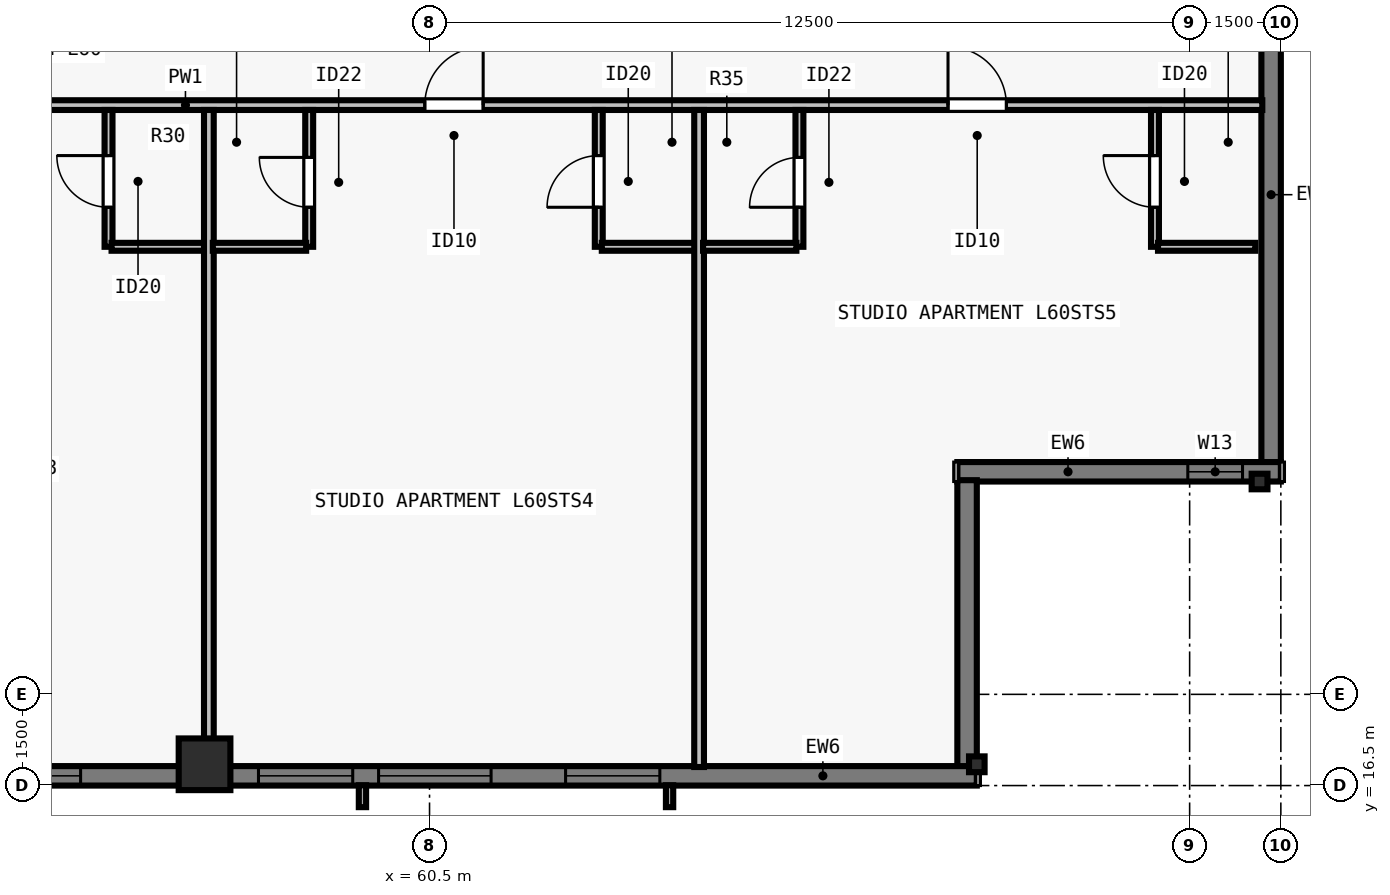
"""IFC4 building model, lengths in metres.
Left out: names, types, materials, properties, quantities, classifications, styles, units other than length and angle.
Written with IfcOpenShell. Run it as: python <this file> out.ifc"""

import sys

from ifc_helpers import new_model, si_unit, direction, frame, frame_2d, origin, origin_2d, place, context, subcontext, project, spatial, rectangle, i_section, extrude, element, fill, save


model = new_model("IFC4")
c1 = context("Model", 3, precision=1e-05, world=origin(), true_north=direction((0.0, 1.0)))
c2 = subcontext(c1, "Body", "Model", "MODEL_VIEW")
j1 = project(units=[si_unit("LENGTHUNIT", "METRE"), si_unit("PLANEANGLEUNIT", "RADIAN")], contexts=[c1])
p1 = place(None, origin())
s1 = spatial("IfcSite", under=j1, at=p1, CompositionType="ELEMENT")
p2 = place(p1, origin())
s2 = spatial("IfcBuilding", under=s1, at=p2, CompositionType="ELEMENT")
p3 = place(p2, frame((0.0, 0.0, 220.0)))
s3 = spatial("IfcBuildingStorey", under=s2, at=p3, CompositionType="ELEMENT", Elevation=220.0)
p4 = place(p3, frame((56.8, 16.85, 0.0), z_axis=(0.0, 0.0, 1.0), x_axis=(1.0, 0.0, 0.0)))
e1 = element("IfcColumn", 1, at=p4, inside=s3, PredefinedType="COLUMN", context=c2, shape_type="SweptSolid", body=[
    extrude(rectangle(XDim=0.85, YDim=0.85, at=origin_2d()), origin(), (0.0, 0.0, 1.0), 3.5),
])
for number, where, z_axis, x_axis in (
    (2, (69.5, 16.85, 0.0), (0.0, 0.0, 1.0), (1.0, 0.0, 0.0)),
    (3, (74.15, 21.5, 0.0), (0.0, 0.0, 1.0), (0.0, 1.0, 0.0)),
):
    element("IfcColumn", number, at=place(p3, frame(where, z_axis=z_axis, x_axis=x_axis)), inside=s3, PredefinedType="COLUMN", context=c2, shape_type="SweptSolid", body=[
        extrude(i_section(OverallWidth=0.256, OverallDepth=0.26, WebThickness=0.01, FlangeThickness=0.017, FilletRadius=0.013, at=origin_2d()), origin(), (0.0, 0.0, 1.0), 3.5),
    ])
p5 = place(p3, frame((74.34, 56.5, 0.0), z_axis=(0.0, 0.0, 1.0), x_axis=(0.0, -1.0, 0.0)))
e4 = element("IfcWall", 4, at=p5, inside=s3, PredefinedType="SOLIDWALL", context=c2, shape_type="SweptSolid", body=[
    extrude(rectangle(XDim=34.702, YDim=0.32, at=frame_2d((17.351, 0.0))), origin(), (0.0, 0.0, 1.0), 3.29),
])
p6 = place(p5, frame((4.312, 0.0, 0.8)))
e5 = element("IfcOpeningElement", 5, at=p6, cuts=e4, PredefinedType="OPENING", context=c2, shape_type="SweptSolid", body=[
    extrude(rectangle(XDim=1.55, YDim=1.678, at=frame_2d((0.775, 0.839))), frame((0.0, 0.17, 0.0), z_axis=(0.0, -1.0, 0.0), x_axis=(1.0, 0.0, 0.0)), (0.0, 0.0, 1.0), 0.34),
])
p7 = place(p5, frame((6.738, 0.0, 0.8)))
e6 = element("IfcOpeningElement", 6, at=p7, cuts=e4, PredefinedType="OPENING", context=c2, shape_type="SweptSolid", body=[
    extrude(rectangle(XDim=1.85, YDim=1.678, at=frame_2d((0.925, 0.839))), frame((0.0, 0.17, 0.0), z_axis=(0.0, -1.0, 0.0), x_axis=(1.0, 0.0, 0.0)), (0.0, 0.0, 1.0), 0.34),
])
p8 = place(p5, frame((10.263, 0.0, 0.8)))
e7 = element("IfcOpeningElement", 7, at=p8, cuts=e4, PredefinedType="OPENING", context=c2, shape_type="SweptSolid", body=[
    extrude(rectangle(XDim=1.55, YDim=1.678, at=frame_2d((0.775, 0.839))), frame((0.0, 0.17, 0.0), z_axis=(0.0, -1.0, 0.0), x_axis=(1.0, 0.0, 0.0)), (0.0, 0.0, 1.0), 0.34),
])
p9 = place(p5, frame((13.488, 0.0, 0.8)))
e8 = element("IfcOpeningElement", 8, at=p9, cuts=e4, PredefinedType="OPENING", context=c2, shape_type="SweptSolid", body=[
    extrude(rectangle(XDim=1.85, YDim=1.678, at=frame_2d((0.925, 0.839))), frame((0.0, 0.17, 0.0), z_axis=(0.0, -1.0, 0.0), x_axis=(1.0, 0.0, 0.0)), (0.0, 0.0, 1.0), 0.34),
])
p10 = place(p5, frame((18.264, 0.0, 0.8)))
e9 = element("IfcOpeningElement", 9, at=p10, cuts=e4, PredefinedType="OPENING", context=c2, shape_type="SweptSolid", body=[
    extrude(rectangle(XDim=1.55, YDim=1.678, at=frame_2d((0.775, 0.839))), frame((0.0, 0.17, 0.0), z_axis=(0.0, -1.0, 0.0), x_axis=(1.0, 0.0, 0.0)), (0.0, 0.0, 1.0), 0.34),
])
p11 = place(p5, frame((24.164, 0.0, 0.8)))
e10 = element("IfcOpeningElement", 10, at=p11, cuts=e4, PredefinedType="OPENING", context=c2, shape_type="SweptSolid", body=[
    extrude(rectangle(XDim=1.55, YDim=1.678, at=frame_2d((0.775, 0.839))), frame((0.0, 0.17, 0.0), z_axis=(0.0, -1.0, 0.0), x_axis=(1.0, 0.0, 0.0)), (0.0, 0.0, 1.0), 0.34),
])
p12 = place(p3, frame((74.5, 21.66, 0.0), z_axis=(0.0, 0.0, 1.0), x_axis=(-1.0, 0.0, 0.0)))
e11 = element("IfcWall", 11, at=p12, inside=s3, PredefinedType="SOLIDWALL", context=c2, shape_type="SweptSolid", body=[
    extrude(rectangle(XDim=5.32, YDim=0.32, at=frame_2d((2.66, 0.0))), origin(), (0.0, 0.0, 1.0), 3.29),
])
p13 = place(p12, frame((0.63, 0.0, 0.8)))
e12 = element("IfcOpeningElement", 12, at=p13, cuts=e11, PredefinedType="OPENING", context=c2, shape_type="SweptSolid", body=[
    extrude(rectangle(XDim=0.9, YDim=1.678, at=frame_2d((0.45, 0.839))), frame((0.0, 0.17, 0.0), z_axis=(0.0, -1.0, 0.0), x_axis=(1.0, 0.0, 0.0)), (0.0, 0.0, 1.0), 0.34),
])
p14 = place(p3, frame((69.34, 21.522, 0.0), z_axis=(0.0, 0.0, 1.0), x_axis=(0.0, -1.0, 0.0)))
e13 = element("IfcWall", 13, at=p14, inside=s3, PredefinedType="SOLIDWALL", context=c2, shape_type="SweptSolid", body=[
    extrude(rectangle(XDim=4.724, YDim=0.32, at=frame_2d((2.362, 0.0))), origin(), (0.0, 0.0, 1.0), 3.29),
])
p15 = place(p3, frame((69.5, 16.66, 0.0), z_axis=(0.0, 0.0, 1.0), x_axis=(-1.0, 0.0, 0.0)))
e14 = element("IfcWall", 14, at=p15, inside=s3, PredefinedType="SOLIDWALL", context=c2, shape_type="SweptSolid", body=[
    extrude(rectangle(XDim=34.702, YDim=0.32, at=frame_2d((17.351, 0.0))), origin(), (0.0, 0.0, 1.0), 3.29),
])
p16 = place(p15, frame((5.213, 0.0, 0.8)))
e15 = element("IfcOpeningElement", 15, at=p16, cuts=e14, PredefinedType="OPENING", context=c2, shape_type="SweptSolid", body=[
    extrude(rectangle(XDim=1.55, YDim=1.678, at=frame_2d((0.775, 0.839))), frame((0.0, 0.17, 0.0), z_axis=(0.0, -1.0, 0.0), x_axis=(1.0, 0.0, 0.0)), (0.0, 0.0, 1.0), 0.34),
])
p17 = place(p15, frame((7.988, 0.0, 0.8)))
e16 = element("IfcOpeningElement", 16, at=p17, cuts=e14, PredefinedType="OPENING", context=c2, shape_type="SweptSolid", body=[
    extrude(rectangle(XDim=1.85, YDim=1.678, at=frame_2d((0.925, 0.839))), frame((0.0, 0.17, 0.0), z_axis=(0.0, -1.0, 0.0), x_axis=(1.0, 0.0, 0.0)), (0.0, 0.0, 1.0), 0.34),
])
p18 = place(p15, frame((10.263, 0.0, 0.8)))
e17 = element("IfcOpeningElement", 17, at=p18, cuts=e14, PredefinedType="OPENING", context=c2, shape_type="SweptSolid", body=[
    extrude(rectangle(XDim=1.55, YDim=1.678, at=frame_2d((0.775, 0.839))), frame((0.0, 0.17, 0.0), z_axis=(0.0, -1.0, 0.0), x_axis=(1.0, 0.0, 0.0)), (0.0, 0.0, 1.0), 0.34),
])
p19 = place(p15, frame((14.738, 0.0, 0.8)))
e18 = element("IfcOpeningElement", 18, at=p19, cuts=e14, PredefinedType="OPENING", context=c2, shape_type="SweptSolid", body=[
    extrude(rectangle(XDim=1.85, YDim=1.678, at=frame_2d((0.925, 0.839))), frame((0.0, 0.17, 0.0), z_axis=(0.0, -1.0, 0.0), x_axis=(1.0, 0.0, 0.0)), (0.0, 0.0, 1.0), 0.34),
])
p20 = place(p15, frame((18.264, 0.0, 0.8)))
e19 = element("IfcOpeningElement", 19, at=p20, cuts=e14, PredefinedType="OPENING", context=c2, shape_type="SweptSolid", body=[
    extrude(rectangle(XDim=1.55, YDim=1.678, at=frame_2d((0.775, 0.839))), frame((0.0, 0.17, 0.0), z_axis=(0.0, -1.0, 0.0), x_axis=(1.0, 0.0, 0.0)), (0.0, 0.0, 1.0), 0.34),
])
p21 = place(p15, frame((25.014, 0.0, 0.8)))
e20 = element("IfcOpeningElement", 20, at=p21, cuts=e14, PredefinedType="OPENING", context=c2, shape_type="SweptSolid", body=[
    extrude(rectangle(XDim=1.55, YDim=1.678, at=frame_2d((0.775, 0.839))), frame((0.0, 0.17, 0.0), z_axis=(0.0, -1.0, 0.0), x_axis=(1.0, 0.0, 0.0)), (0.0, 0.0, 1.0), 0.34),
])
p22 = place(p15, frame((27.789, 0.0, 0.8)))
e21 = element("IfcOpeningElement", 21, at=p22, cuts=e14, PredefinedType="OPENING", context=c2, shape_type="SweptSolid", body=[
    extrude(rectangle(XDim=1.85, YDim=1.678, at=frame_2d((0.925, 0.839))), frame((0.0, 0.17, 0.0), z_axis=(0.0, -1.0, 0.0), x_axis=(1.0, 0.0, 0.0)), (0.0, 0.0, 1.0), 0.34),
])
p23 = place(p15, frame((30.71, 0.0, 0.8)))
e22 = element("IfcOpeningElement", 22, at=p23, cuts=e14, PredefinedType="OPENING", context=c2, shape_type="SweptSolid", body=[
    extrude(rectangle(XDim=0.9, YDim=1.678, at=frame_2d((0.45, 0.839))), frame((0.0, 0.17, 0.0), z_axis=(0.0, -1.0, 0.0), x_axis=(1.0, 0.0, 0.0)), (0.0, 0.0, 1.0), 0.34),
])
p24 = place(p3, frame((29.805, 27.69, 0.0), z_axis=(0.0, 0.0, 1.0), x_axis=(1.0, 0.0, 0.0)))
e23 = element("IfcWall", 23, at=p24, inside=s3, PredefinedType="PARTITIONING", context=c2, shape_type="SweptSolid", body=[
    extrude(rectangle(XDim=44.39, YDim=0.16, at=frame_2d((22.195, 0.0))), origin(), (0.0, 0.0, 1.0), 2.958),
])
p25 = place(p24, frame((4.279, 0.0, 0.0)))
e24 = element("IfcOpeningElement", 24, at=p25, cuts=e23, PredefinedType="OPENING", context=c2, shape_type="SweptSolid", body=[
    extrude(rectangle(XDim=0.96, YDim=2.18, at=frame_2d((0.48, 1.09))), frame((0.0, 0.09, 0.0), z_axis=(0.0, -1.0, 0.0), x_axis=(1.0, 0.0, 0.0)), (0.0, 0.0, 1.0), 0.18),
])
p26 = place(p24, frame((12.953, 0.0, 0.0)))
e25 = element("IfcOpeningElement", 25, at=p26, cuts=e23, PredefinedType="OPENING", context=c2, shape_type="SweptSolid", body=[
    extrude(rectangle(XDim=0.96, YDim=2.18, at=frame_2d((0.48, 1.09))), frame((0.0, 0.09, 0.0), z_axis=(0.0, -1.0, 0.0), x_axis=(1.0, 0.0, 0.0)), (0.0, 0.0, 1.0), 0.18),
])
p27 = place(p24, frame((21.785, 0.0, 0.0)))
e26 = element("IfcOpeningElement", 26, at=p27, cuts=e23, PredefinedType="OPENING", context=c2, shape_type="SweptSolid", body=[
    extrude(rectangle(XDim=0.96, YDim=2.18, at=frame_2d((0.48, 1.09))), frame((0.0, 0.09, 0.0), z_axis=(0.0, -1.0, 0.0), x_axis=(1.0, 0.0, 0.0)), (0.0, 0.0, 1.0), 0.18),
])
p28 = place(p24, frame((30.617, 0.0, 0.0)))
e27 = element("IfcOpeningElement", 27, at=p28, cuts=e23, PredefinedType="OPENING", context=c2, shape_type="SweptSolid", body=[
    extrude(rectangle(XDim=0.96, YDim=2.18, at=frame_2d((0.48, 1.09))), frame((0.0, 0.09, 0.0), z_axis=(0.0, -1.0, 0.0), x_axis=(1.0, 0.0, 0.0)), (0.0, 0.0, 1.0), 0.18),
])
p29 = place(p24, frame((39.221, 0.0, 0.0)))
e28 = element("IfcOpeningElement", 28, at=p29, cuts=e23, PredefinedType="OPENING", context=c2, shape_type="SweptSolid", body=[
    extrude(rectangle(XDim=0.96, YDim=2.18, at=frame_2d((0.48, 1.09))), frame((0.0, 0.09, 0.0), z_axis=(0.0, -1.0, 0.0), x_axis=(1.0, 0.0, 0.0)), (0.0, 0.0, 1.0), 0.18),
])
p30 = place(p3, frame((55.221, 25.36, 0.0), z_axis=(0.0, 0.0, 1.0), x_axis=(0.0, 1.0, 0.0)))
e29 = element("IfcWall", 29, at=p30, inside=s3, PredefinedType="PLUMBINGWALL", context=c2, shape_type="SweptSolid", body=[
    extrude(rectangle(XDim=2.25, YDim=0.13, at=frame_2d((1.125, 0.0))), origin(), (0.0, 0.0, 1.0), 3.29),
])
p31 = place(p30, frame((0.65, 0.0, 0.0)))
e30 = element("IfcOpeningElement", 30, at=p31, cuts=e29, PredefinedType="OPENING", context=c2, shape_type="SweptSolid", body=[
    extrude(rectangle(XDim=0.85, YDim=2.1, at=frame_2d((0.425, 1.05))), frame((0.0, 0.075, 0.0), z_axis=(0.0, -1.0, 0.0), x_axis=(1.0, 0.0, 0.0)), (0.0, 0.0, 1.0), 0.15),
])
p32 = place(p3, frame((55.271, 25.36, 0.0), z_axis=(0.0, 0.0, 1.0), x_axis=(1.0, 0.0, 0.0)))
e31 = element("IfcWall", 31, at=p32, inside=s3, PredefinedType="PLUMBINGWALL", context=c2, shape_type="SweptSolid", body=[
    extrude(rectangle(XDim=1.6, YDim=0.13, at=frame_2d((0.8, 0.0))), origin(), (0.0, 0.0, 1.0), 3.29),
])
p33 = place(p3, frame((56.871, 16.805, 0.0), z_axis=(0.0, 0.0, 1.0), x_axis=(0.0, 1.0, 0.0)))
e32 = element("IfcWall", 32, at=p33, inside=s3, PredefinedType="PARTITIONING", context=c2, shape_type="SweptSolid", body=[
    extrude(rectangle(XDim=10.805, YDim=0.16, at=frame_2d((5.403, 0.0))), origin(), (0.0, 0.0, 1.0), 2.573),
])
p34 = place(p3, frame((58.521, 25.36, 0.0), z_axis=(0.0, 0.0, 1.0), x_axis=(0.0, 1.0, 0.0)))
e33 = element("IfcWall", 33, at=p34, inside=s3, PredefinedType="PLUMBINGWALL", context=c2, shape_type="SweptSolid", body=[
    extrude(rectangle(XDim=2.25, YDim=0.13, at=frame_2d((1.125, 0.0))), origin(), (0.0, 0.0, 1.0), 3.29),
])
p35 = place(p34, frame((0.65, 0.0, 0.0)))
e34 = element("IfcOpeningElement", 34, at=p35, cuts=e33, PredefinedType="OPENING", context=c2, shape_type="SweptSolid", body=[
    extrude(rectangle(XDim=0.82, YDim=2.1, at=frame_2d((0.41, 1.05))), frame((0.0, 0.075, 0.0), z_axis=(0.0, -1.0, 0.0), x_axis=(1.0, 0.0, 0.0)), (0.0, 0.0, 1.0), 0.15),
])
p36 = place(p3, frame((56.936, 25.36, 0.0), z_axis=(0.0, 0.0, 1.0), x_axis=(1.0, 0.0, 0.0)))
e35 = element("IfcWall", 35, at=p36, inside=s3, PredefinedType="PLUMBINGWALL", context=c2, shape_type="SweptSolid", body=[
    extrude(rectangle(XDim=1.535, YDim=0.13, at=frame_2d((0.768, 0.0))), origin(), (0.0, 0.0, 1.0), 3.29),
])
p37 = place(p3, frame((63.283, 25.36, 0.0), z_axis=(0.0, 0.0, 1.0), x_axis=(0.0, 1.0, 0.0)))
e36 = element("IfcWall", 36, at=p37, inside=s3, PredefinedType="PLUMBINGWALL", context=c2, shape_type="SweptSolid", body=[
    extrude(rectangle(XDim=2.25, YDim=0.13, at=frame_2d((1.125, 0.0))), origin(), (0.0, 0.0, 1.0), 2.573),
])
p38 = place(p37, frame((0.65, 0.0, 0.0)))
e37 = element("IfcOpeningElement", 37, at=p38, cuts=e36, PredefinedType="OPENING", context=c2, shape_type="SweptSolid", body=[
    extrude(rectangle(XDim=0.85, YDim=2.1, at=frame_2d((0.425, 1.05))), frame((0.0, 0.075, 0.0), z_axis=(0.0, -1.0, 0.0), x_axis=(1.0, 0.0, 0.0)), (0.0, 0.0, 1.0), 0.15),
])
p39 = place(p3, frame((63.333, 25.36, 0.0), z_axis=(0.0, 0.0, 1.0), x_axis=(1.0, 0.0, 0.0)))
e38 = element("IfcWall", 38, at=p39, inside=s3, PredefinedType="PLUMBINGWALL", context=c2, shape_type="SweptSolid", body=[
    extrude(rectangle(XDim=1.6, YDim=0.13, at=frame_2d((0.8, 0.0))), origin(), (0.0, 0.0, 1.0), 3.29),
])
p40 = place(p3, frame((64.933, 16.805, 0.0), z_axis=(0.0, 0.0, 1.0), x_axis=(0.0, 1.0, 0.0)))
e39 = element("IfcWall", 39, at=p40, inside=s3, PredefinedType="PARTITIONING", context=c2, shape_type="SweptSolid", body=[
    extrude(rectangle(XDim=10.805, YDim=0.16, at=frame_2d((5.403, 0.0))), origin(), (0.0, 0.0, 1.0), 2.573),
])
p41 = place(p3, frame((66.583, 25.36, 0.0), z_axis=(0.0, 0.0, 1.0), x_axis=(0.0, 1.0, 0.0)))
e40 = element("IfcWall", 40, at=p41, inside=s3, PredefinedType="PLUMBINGWALL", context=c2, shape_type="SweptSolid", body=[
    extrude(rectangle(XDim=2.25, YDim=0.13, at=frame_2d((1.125, 0.0))), origin(), (0.0, 0.0, 1.0), 3.29),
])
p42 = place(p41, frame((0.65, 0.0, 0.0)))
e41 = element("IfcOpeningElement", 41, at=p42, cuts=e40, PredefinedType="OPENING", context=c2, shape_type="SweptSolid", body=[
    extrude(rectangle(XDim=0.82, YDim=2.1, at=frame_2d((0.41, 1.05))), frame((0.0, 0.075, 0.0), z_axis=(0.0, -1.0, 0.0), x_axis=(1.0, 0.0, 0.0)), (0.0, 0.0, 1.0), 0.15),
])
p43 = place(p3, frame((64.998, 25.36, 0.0), z_axis=(0.0, 0.0, 1.0), x_axis=(1.0, 0.0, 0.0)))
e42 = element("IfcWall", 42, at=p43, inside=s3, PredefinedType="PLUMBINGWALL", context=c2, shape_type="SweptSolid", body=[
    extrude(rectangle(XDim=1.535, YDim=0.13, at=frame_2d((0.768, 0.0))), origin(), (0.0, 0.0, 1.0), 3.29),
])
p44 = place(p3, frame((72.43, 25.36, 0.0), z_axis=(0.0, 0.0, 1.0), x_axis=(0.0, 1.0, 0.0)))
e43 = element("IfcWall", 43, at=p44, inside=s3, PredefinedType="PLUMBINGWALL", context=c2, shape_type="SweptSolid", body=[
    extrude(rectangle(XDim=2.25, YDim=0.13, at=frame_2d((1.125, 0.0))), origin(), (0.0, 0.0, 1.0), 3.29),
])
p45 = place(p44, frame((0.65, 0.0, 0.0)))
e44 = element("IfcOpeningElement", 44, at=p45, cuts=e43, PredefinedType="OPENING", context=c2, shape_type="SweptSolid", body=[
    extrude(rectangle(XDim=0.85, YDim=2.1, at=frame_2d((0.425, 1.05))), frame((0.0, 0.075, 0.0), z_axis=(0.0, -1.0, 0.0), x_axis=(1.0, 0.0, 0.0)), (0.0, 0.0, 1.0), 0.15),
])
p46 = place(p3, frame((72.48, 25.36, 0.0), z_axis=(0.0, 0.0, 1.0), x_axis=(1.0, 0.0, 0.0)))
e45 = element("IfcWall", 45, at=p46, inside=s3, PredefinedType="PLUMBINGWALL", context=c2, shape_type="SweptSolid", body=[
    extrude(rectangle(XDim=1.6, YDim=0.13, at=frame_2d((0.8, 0.0))), origin(), (0.0, 0.0, 1.0), 3.29),
])
p47 = place(p16, origin())
e46 = element("IfcWindow", 46, at=p47, inside=s3, PartitioningType="SINGLE_PANEL", PredefinedType="WINDOW", context=c2, shape_type="SweptSolid", body=[
    extrude(rectangle(XDim=1.55, YDim=1.678, at=frame_2d((0.775, 0.839))), frame((0.0, -0.05, 0.0), z_axis=(0.0, -1.0, 0.0), x_axis=(1.0, 0.0, 0.0)), (0.0, 0.0, 1.0), 0.06),
])
fill(e15, e46)
p48 = place(p17, origin())
e47 = element("IfcWindow", 47, at=p48, inside=s3, PartitioningType="SINGLE_PANEL", PredefinedType="WINDOW", context=c2, shape_type="SweptSolid", body=[
    extrude(rectangle(XDim=1.85, YDim=1.678, at=frame_2d((0.925, 0.839))), frame((0.0, -0.05, 0.0), z_axis=(0.0, -1.0, 0.0), x_axis=(1.0, 0.0, 0.0)), (0.0, 0.0, 1.0), 0.06),
])
fill(e16, e47)
p49 = place(p18, origin())
e48 = element("IfcWindow", 48, at=p49, inside=s3, PartitioningType="SINGLE_PANEL", PredefinedType="WINDOW", context=c2, shape_type="SweptSolid", body=[
    extrude(rectangle(XDim=1.55, YDim=1.678, at=frame_2d((0.775, 0.839))), frame((0.0, -0.05, 0.0), z_axis=(0.0, -1.0, 0.0), x_axis=(1.0, 0.0, 0.0)), (0.0, 0.0, 1.0), 0.06),
])
fill(e17, e48)
p50 = place(p19, origin())
e49 = element("IfcWindow", 49, at=p50, inside=s3, PartitioningType="SINGLE_PANEL", PredefinedType="WINDOW", context=c2, shape_type="SweptSolid", body=[
    extrude(rectangle(XDim=1.85, YDim=1.678, at=frame_2d((0.925, 0.839))), frame((0.0, -0.05, 0.0), z_axis=(0.0, -1.0, 0.0), x_axis=(1.0, 0.0, 0.0)), (0.0, 0.0, 1.0), 0.06),
])
fill(e18, e49)
p51 = place(p13, origin())
e50 = element("IfcWindow", 50, at=p51, inside=s3, PartitioningType="SINGLE_PANEL", PredefinedType="WINDOW", context=c2, shape_type="SweptSolid", body=[
    extrude(rectangle(XDim=0.9, YDim=1.678, at=frame_2d((0.45, 0.839))), frame((0.0, -0.04, 0.0), z_axis=(0.0, -1.0, 0.0), x_axis=(1.0, 0.0, 0.0)), (0.0, 0.0, 1.0), 0.06),
])
fill(e12, e50)
p52 = place(p31, origin())
e51 = element("IfcDoor", 51, at=p52, inside=s3, OperationType="SINGLE_SWING_RIGHT", PredefinedType="DOOR", context=c2, shape_type="SweptSolid", body=[
    extrude(rectangle(XDim=0.85, YDim=2.1, at=frame_2d((0.425, 1.05))), frame((0.0, 0.025, 0.0), z_axis=(0.0, -1.0, 0.0), x_axis=(1.0, 0.0, 0.0)), (0.0, 0.0, 1.0), 0.05),
])
fill(e30, e51)
p53 = place(p35, origin())
e52 = element("IfcDoor", 52, at=p53, inside=s3, OperationType="SINGLE_SWING_RIGHT", PredefinedType="DOOR", context=c2, shape_type="SweptSolid", body=[
    extrude(rectangle(XDim=0.82, YDim=2.1, at=frame_2d((0.41, 1.05))), frame((0.0, 0.025, 0.0), z_axis=(0.0, -1.0, 0.0), x_axis=(1.0, 0.0, 0.0)), (0.0, 0.0, 1.0), 0.05),
])
fill(e34, e52)
p54 = place(p38, origin())
e53 = element("IfcDoor", 53, at=p54, inside=s3, OperationType="SINGLE_SWING_LEFT", PredefinedType="DOOR", context=c2, shape_type="SweptSolid", body=[
    extrude(rectangle(XDim=0.85, YDim=2.1, at=frame_2d((0.425, 1.05))), frame((0.0, 0.025, 0.0), z_axis=(0.0, -1.0, 0.0), x_axis=(1.0, 0.0, 0.0)), (0.0, 0.0, 1.0), 0.05),
])
fill(e37, e53)
p55 = place(p28, origin())
e54 = element("IfcDoor", 54, at=p55, inside=s3, OperationType="SINGLE_SWING_RIGHT", PredefinedType="DOOR", context=c2, shape_type="SweptSolid", body=[
    extrude(rectangle(XDim=0.96, YDim=2.18, at=frame_2d((0.48, 1.09))), frame((0.0, 0.025, 0.0), z_axis=(0.0, -1.0, 0.0), x_axis=(1.0, 0.0, 0.0)), (0.0, 0.0, 1.0), 0.05),
])
fill(e27, e54)
p56 = place(p42, origin())
e55 = element("IfcDoor", 55, at=p56, inside=s3, OperationType="SINGLE_SWING_LEFT", PredefinedType="DOOR", context=c2, shape_type="SweptSolid", body=[
    extrude(rectangle(XDim=0.82, YDim=2.1, at=frame_2d((0.41, 1.05))), frame((0.0, 0.025, 0.0), z_axis=(0.0, -1.0, 0.0), x_axis=(1.0, 0.0, 0.0)), (0.0, 0.0, 1.0), 0.05),
])
fill(e41, e55)
p57 = place(p45, origin())
e56 = element("IfcDoor", 56, at=p57, inside=s3, OperationType="SINGLE_SWING_RIGHT", PredefinedType="DOOR", context=c2, shape_type="SweptSolid", body=[
    extrude(rectangle(XDim=0.85, YDim=2.1, at=frame_2d((0.425, 1.05))), frame((0.0, 0.025, 0.0), z_axis=(0.0, -1.0, 0.0), x_axis=(1.0, 0.0, 0.0)), (0.0, 0.0, 1.0), 0.05),
])
fill(e44, e56)
p58 = place(p29, origin())
e57 = element("IfcDoor", 57, at=p58, inside=s3, OperationType="SINGLE_SWING_LEFT", PredefinedType="DOOR", context=c2, shape_type="SweptSolid", body=[
    extrude(rectangle(XDim=0.96, YDim=2.18, at=frame_2d((0.48, 1.09))), frame((0.0, 0.025, 0.0), z_axis=(0.0, -1.0, 0.0), x_axis=(1.0, 0.0, 0.0)), (0.0, 0.0, 1.0), 0.05),
])
fill(e28, e57)
save(model, sys.argv[1])
